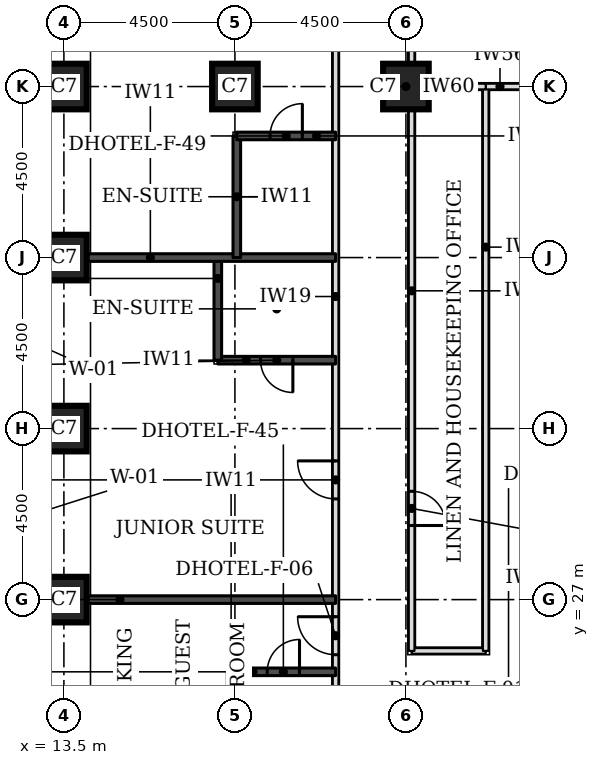
"""IFC4 building model, lengths in metres.
Left out: names, types, materials, properties, quantities, classifications, styles, units other than length and angle.
Written with IfcOpenShell. Run it as: python <this file> out.ifc"""

import sys

from ifc_helpers import new_model, si_unit, direction, frame, frame_2d, origin, origin_2d, place, context, subcontext, project, spatial, rectangle, extrude, element, fill, save


model = new_model("IFC4")
c1 = context("Model", 3, precision=1e-05, world=origin(), true_north=direction((0.0, 1.0)))
c2 = subcontext(c1, "Body", "Model", "MODEL_VIEW")
j1 = project(units=[si_unit("LENGTHUNIT", "METRE"), si_unit("PLANEANGLEUNIT", "RADIAN")], contexts=[c1])
p1 = place(None, origin())
s1 = spatial("IfcSite", under=j1, at=p1, CompositionType="ELEMENT")
p2 = place(p1, origin())
s2 = spatial("IfcBuilding", under=s1, at=p2, CompositionType="ELEMENT")
p3 = place(p2, frame((0.0, 0.0, 42.9)))
s3 = spatial("IfcBuildingStorey", under=s2, at=p3, CompositionType="ELEMENT", Elevation=42.9)
for number, where, z_axis, x_axis in (
    (1, (13.5, 27.0, 0.0), (0.0, 0.0, 1.0), (1.0, 0.0, 0.0)),
    (2, (13.5, 31.5, 0.0), (0.0, 0.0, 1.0), (1.0, 0.0, 0.0)),
    (3, (13.5, 36.0, 0.0), (0.0, 0.0, 1.0), (1.0, 0.0, 0.0)),
    (4, (13.5, 40.5, 0.0), (0.0, 0.0, 1.0), (1.0, 0.0, 0.0)),
    (5, (18.0, 40.5, 0.0), (0.0, 0.0, 1.0), (1.0, 0.0, 0.0)),
    (6, (22.5, 40.5, 0.0), (0.0, 0.0, 1.0), (1.0, 0.0, 0.0)),
):
    element("IfcColumn", number, at=place(p3, frame(where, z_axis=z_axis, x_axis=x_axis)), inside=s3, PredefinedType="COLUMN", context=c2, shape_type="SweptSolid", body=[
        extrude(rectangle(XDim=1.2, YDim=1.2, at=origin_2d()), origin(), (0.0, 0.0, 1.0), 3.3),
    ])
p4 = place(p3, frame((20.65, 23.65, 0.0), z_axis=(0.0, 0.0, 1.0), x_axis=(0.0, 1.0, 0.0)))
e7 = element("IfcWall", 7, at=p4, inside=s3, PredefinedType="PARTITIONING", context=c2, shape_type="SweptSolid", body=[
    extrude(rectangle(XDim=25.85, YDim=0.15, at=frame_2d((12.925, 0.0))), origin(), (0.0, 0.0, 1.0), 3.08),
])
p5 = place(p4, frame((1.9, 0.0, 0.0)))
e8 = element("IfcOpeningElement", 8, at=p5, cuts=e7, PredefinedType="OPENING", context=c2, shape_type="SweptSolid", body=[
    extrude(rectangle(XDim=1.0, YDim=2.1, at=frame_2d((0.5, 1.05))), frame((0.0, 0.085, 0.0), z_axis=(0.0, -1.0, 0.0), x_axis=(1.0, 0.0, 0.0)), (0.0, 0.0, 1.0), 0.17),
])
p6 = place(p4, frame((6.0, 0.0, 0.0)))
e9 = element("IfcOpeningElement", 9, at=p6, cuts=e7, PredefinedType="OPENING", context=c2, shape_type="SweptSolid", body=[
    extrude(rectangle(XDim=1.0, YDim=2.1, at=frame_2d((0.5, 1.05))), frame((0.0, 0.085, 0.0), z_axis=(0.0, -1.0, 0.0), x_axis=(1.0, 0.0, 0.0)), (0.0, 0.0, 1.0), 0.17),
])
p7 = place(p4, frame((17.95, 0.0, 0.0)))
e10 = element("IfcOpeningElement", 10, at=p7, cuts=e7, PredefinedType="OPENING", context=c2, shape_type="SweptSolid", body=[
    extrude(rectangle(XDim=1.0, YDim=2.1, at=frame_2d((0.5, 1.05))), frame((0.0, 0.085, 0.0), z_axis=(0.0, -1.0, 0.0), x_axis=(1.0, 0.0, 0.0)), (0.0, 0.0, 1.0), 0.17),
])
p8 = place(p4, frame((23.04, 0.0, 0.0)))
e11 = element("IfcOpeningElement", 11, at=p8, cuts=e7, PredefinedType="OPENING", context=c2, shape_type="SweptSolid", body=[
    extrude(rectangle(XDim=0.9, YDim=2.1, at=frame_2d((0.45, 1.05))), frame((0.0, 0.085, 0.0), z_axis=(0.0, -1.0, 0.0), x_axis=(1.0, 0.0, 0.0)), (0.0, 0.0, 1.0), 0.17),
])
p9 = place(p3, frame((22.65, 25.65, 0.0), z_axis=(0.0, 0.0, 1.0), x_axis=(1.0, 0.0, 0.0)))
e12 = element("IfcWall", 12, at=p9, inside=s3, PredefinedType="PARTITIONING", context=c2, shape_type="SweptSolid", body=[
    extrude(rectangle(XDim=1.95, YDim=0.15, at=frame_2d((0.975, 0.0))), origin(), (0.0, 0.0, 1.0), 3.08),
])
p10 = place(p3, frame((22.65, 25.65, 0.0), z_axis=(0.0, 0.0, 1.0), x_axis=(0.0, 1.0, 0.0)))
e13 = element("IfcWall", 13, at=p10, inside=s3, PredefinedType="PARTITIONING", context=c2, shape_type="SweptSolid", body=[
    extrude(rectangle(XDim=17.35, YDim=0.15, at=frame_2d((8.675, 0.0))), origin(), (0.0, 0.0, 1.0), 3.08),
])
p11 = place(p10, frame((3.3, 0.0, 0.0)))
e14 = element("IfcOpeningElement", 14, at=p11, cuts=e13, PredefinedType="OPENING", context=c2, shape_type="SweptSolid", body=[
    extrude(rectangle(XDim=0.9, YDim=2.1, at=frame_2d((0.45, 1.05))), frame((0.0, 0.085, 0.0), z_axis=(0.0, -1.0, 0.0), x_axis=(1.0, 0.0, 0.0)), (0.0, 0.0, 1.0), 0.17),
])
p12 = place(p3, frame((24.6, 25.65, 0.0), z_axis=(0.0, 0.0, 1.0), x_axis=(0.0, 1.0, 0.0)))
e15 = element("IfcWall", 15, at=p12, inside=s3, PredefinedType="PARTITIONING", context=c2, shape_type="SweptSolid", body=[
    extrude(rectangle(XDim=14.85, YDim=0.15, at=frame_2d((7.425, 0.0))), origin(), (0.0, 0.0, 1.0), 3.08),
])
p13 = place(p3, frame((24.6, 40.5, 0.0), z_axis=(0.0, 0.0, 1.0), x_axis=(1.0, 0.0, 0.0)))
e16 = element("IfcWall", 16, at=p13, inside=s3, PredefinedType="PARTITIONING", context=c2, shape_type="SweptSolid", body=[
    extrude(rectangle(XDim=2.35, YDim=0.15, at=frame_2d((1.175, 0.0))), origin(), (0.0, 0.0, 1.0), 2.33),
])
p14 = place(p3, frame((17.9, 22.5, 0.0), z_axis=(0.0, 0.0, 1.0), x_axis=(0.0, 1.0, 0.0)))
e17 = element("IfcWall", 17, at=p14, inside=s3, PredefinedType="SOLIDWALL", context=c2, shape_type="SweptSolid", body=[
    extrude(rectangle(XDim=2.6, YDim=0.2, at=frame_2d((1.3, 0.0))), origin(), (0.0, 0.0, 1.0), 3.08),
])
p15 = place(p3, frame((17.9, 25.1, 0.0), z_axis=(0.0, 0.0, 1.0), x_axis=(1.0, 0.0, 0.0)))
e18 = element("IfcWall", 18, at=p15, inside=s3, PredefinedType="SOLIDWALL", context=c2, shape_type="SweptSolid", body=[
    extrude(rectangle(XDim=2.75, YDim=0.2, at=frame_2d((1.375, 0.0))), origin(), (0.0, 0.0, 1.0), 3.08),
])
p16 = place(p15, frame((0.95, 0.0, 0.0)))
e19 = element("IfcOpeningElement", 19, at=p16, cuts=e18, PredefinedType="OPENING", context=c2, shape_type="SweptSolid", body=[
    extrude(rectangle(XDim=0.85, YDim=2.1, at=frame_2d((0.425, 1.05))), frame((0.0, 0.11, 0.0), z_axis=(0.0, -1.0, 0.0), x_axis=(1.0, 0.0, 0.0)), (0.0, 0.0, 1.0), 0.22),
])
p17 = place(p3, frame((14.1, 27.0, 0.0), z_axis=(0.0, 0.0, 1.0), x_axis=(1.0, 0.0, 0.0)))
e20 = element("IfcWall", 20, at=p17, inside=s3, PredefinedType="SOLIDWALL", context=c2, shape_type="SweptSolid", body=[
    extrude(rectangle(XDim=6.55, YDim=0.2, at=frame_2d((3.275, 0.0))), origin(), (0.0, 0.0, 1.0), 3.08),
])
p18 = place(p3, frame((17.55, 33.3, 0.0), z_axis=(0.0, 0.0, 1.0), x_axis=(1.0, 0.0, 0.0)))
e21 = element("IfcWall", 21, at=p18, inside=s3, PredefinedType="SOLIDWALL", context=c2, shape_type="SweptSolid", body=[
    extrude(rectangle(XDim=3.1, YDim=0.2, at=frame_2d((1.55, 0.0))), origin(), (0.0, 0.0, 1.0), 3.08),
])
p19 = place(p18, frame((1.125, 0.0, 0.0)))
e22 = element("IfcOpeningElement", 22, at=p19, cuts=e21, PredefinedType="OPENING", context=c2, shape_type="SweptSolid", body=[
    extrude(rectangle(XDim=0.85, YDim=2.1, at=frame_2d((0.425, 1.05))), frame((0.0, 0.11, 0.0), z_axis=(0.0, -1.0, 0.0), x_axis=(1.0, 0.0, 0.0)), (0.0, 0.0, 1.0), 0.22),
])
p20 = place(p3, frame((17.55, 33.3, 0.0), z_axis=(0.0, 0.0, 1.0), x_axis=(0.0, 1.0, 0.0)))
e23 = element("IfcWall", 23, at=p20, inside=s3, PredefinedType="SOLIDWALL", context=c2, shape_type="SweptSolid", body=[
    extrude(rectangle(XDim=2.7, YDim=0.2, at=frame_2d((1.35, 0.0))), origin(), (0.0, 0.0, 1.0), 3.08),
])
p21 = place(p3, frame((14.1, 36.0, 0.0), z_axis=(0.0, 0.0, 1.0), x_axis=(1.0, 0.0, 0.0)))
e24 = element("IfcWall", 24, at=p21, inside=s3, PredefinedType="SOLIDWALL", context=c2, shape_type="SweptSolid", body=[
    extrude(rectangle(XDim=6.55, YDim=0.2, at=frame_2d((3.275, 0.0))), origin(), (0.0, 0.0, 1.0), 3.08),
])
p22 = place(p3, frame((18.05, 36.0, 0.0), z_axis=(0.0, 0.0, 1.0), x_axis=(0.0, 1.0, 0.0)))
e25 = element("IfcWall", 25, at=p22, inside=s3, PredefinedType="SOLIDWALL", context=c2, shape_type="SweptSolid", body=[
    extrude(rectangle(XDim=3.2, YDim=0.2, at=frame_2d((1.6, 0.0))), origin(), (0.0, 0.0, 1.0), 3.08),
])
p23 = place(p3, frame((18.05, 39.2, 0.0), z_axis=(0.0, 0.0, 1.0), x_axis=(1.0, 0.0, 0.0)))
e26 = element("IfcWall", 26, at=p23, inside=s3, PredefinedType="SOLIDWALL", context=c2, shape_type="SweptSolid", body=[
    extrude(rectangle(XDim=2.6, YDim=0.2, at=frame_2d((1.3, 0.0))), origin(), (0.0, 0.0, 1.0), 3.08),
])
p24 = place(p23, frame((0.875, 0.0, 0.0)))
e27 = element("IfcOpeningElement", 27, at=p24, cuts=e26, PredefinedType="OPENING", context=c2, shape_type="SweptSolid", body=[
    extrude(rectangle(XDim=0.85, YDim=2.1, at=frame_2d((0.425, 1.05))), frame((0.0, 0.11, 0.0), z_axis=(0.0, -1.0, 0.0), x_axis=(1.0, 0.0, 0.0)), (0.0, 0.0, 1.0), 0.22),
])
p25 = place(p3, frame((22.65, 40.5, 0.0), z_axis=(0.0, 0.0, 1.0), x_axis=(1.0, 0.0, 0.0)))
e28 = element("IfcWall", 28, at=p25, inside=s3, PredefinedType="PARTITIONING", context=c2, shape_type="SweptSolid", body=[
    extrude(rectangle(XDim=1.95, YDim=0.15, at=frame_2d((0.975, 0.0))), origin(), (0.0, 0.0, 1.0), 2.33),
])
p26 = place(p5, origin())
e29 = element("IfcDoor", 29, at=p26, inside=s3, OperationType="SINGLE_SWING_RIGHT", PredefinedType="DOOR", context=c2, shape_type="SweptSolid", body=[
    extrude(rectangle(XDim=1.0, YDim=2.1, at=frame_2d((0.5, 1.05))), frame((0.0, 0.025, 0.0), z_axis=(0.0, -1.0, 0.0), x_axis=(1.0, 0.0, 0.0)), (0.0, 0.0, 1.0), 0.05),
])
fill(e8, e29)
p27 = place(p16, origin())
e30 = element("IfcDoor", 30, at=p27, inside=s3, OperationType="SINGLE_SWING_RIGHT", PredefinedType="DOOR", context=c2, shape_type="SweptSolid", body=[
    extrude(rectangle(XDim=0.85, YDim=2.1, at=frame_2d((0.425, 1.05))), frame((0.0, 0.025, 0.0), z_axis=(0.0, -1.0, 0.0), x_axis=(1.0, 0.0, 0.0)), (0.0, 0.0, 1.0), 0.05),
])
fill(e19, e30)
p28 = place(p6, origin())
e31 = element("IfcDoor", 31, at=p28, inside=s3, OperationType="SINGLE_SWING_RIGHT", PredefinedType="DOOR", context=c2, shape_type="SweptSolid", body=[
    extrude(rectangle(XDim=1.0, YDim=2.1, at=frame_2d((0.5, 1.05))), frame((0.0, 0.025, 0.0), z_axis=(0.0, -1.0, 0.0), x_axis=(1.0, 0.0, 0.0)), (0.0, 0.0, 1.0), 0.05),
])
fill(e9, e31)
p29 = place(p19, frame((0.85, 0.0, 0.0), z_axis=(0.0, 0.0, 1.0), x_axis=(-1.0, 0.0, 0.0)))
e32 = element("IfcDoor", 32, at=p29, inside=s3, OperationType="SINGLE_SWING_LEFT", PredefinedType="DOOR", context=c2, shape_type="SweptSolid", body=[
    extrude(rectangle(XDim=0.85, YDim=2.1, at=frame_2d((0.425, 1.05))), frame((0.0, 0.025, 0.0), z_axis=(0.0, -1.0, 0.0), x_axis=(1.0, 0.0, 0.0)), (0.0, 0.0, 1.0), 0.05),
])
fill(e22, e32)
p30 = place(p24, origin())
e33 = element("IfcDoor", 33, at=p30, inside=s3, OperationType="SINGLE_SWING_RIGHT", PredefinedType="DOOR", context=c2, shape_type="SweptSolid", body=[
    extrude(rectangle(XDim=0.85, YDim=2.1, at=frame_2d((0.425, 1.05))), frame((0.0, 0.025, 0.0), z_axis=(0.0, -1.0, 0.0), x_axis=(1.0, 0.0, 0.0)), (0.0, 0.0, 1.0), 0.05),
])
fill(e27, e33)
p31 = place(p11, frame((0.9, 0.0, 0.0), z_axis=(0.0, 0.0, 1.0), x_axis=(-1.0, 0.0, 0.0)))
e34 = element("IfcDoor", 34, at=p31, inside=s3, OperationType="SINGLE_SWING_RIGHT", PredefinedType="DOOR", context=c2, shape_type="SweptSolid", body=[
    extrude(rectangle(XDim=0.9, YDim=2.1, at=frame_2d((0.45, 1.05))), frame((0.0, 0.025, 0.0), z_axis=(0.0, -1.0, 0.0), x_axis=(1.0, 0.0, 0.0)), (0.0, 0.0, 1.0), 0.05),
])
fill(e14, e34)
save(model, sys.argv[1])
